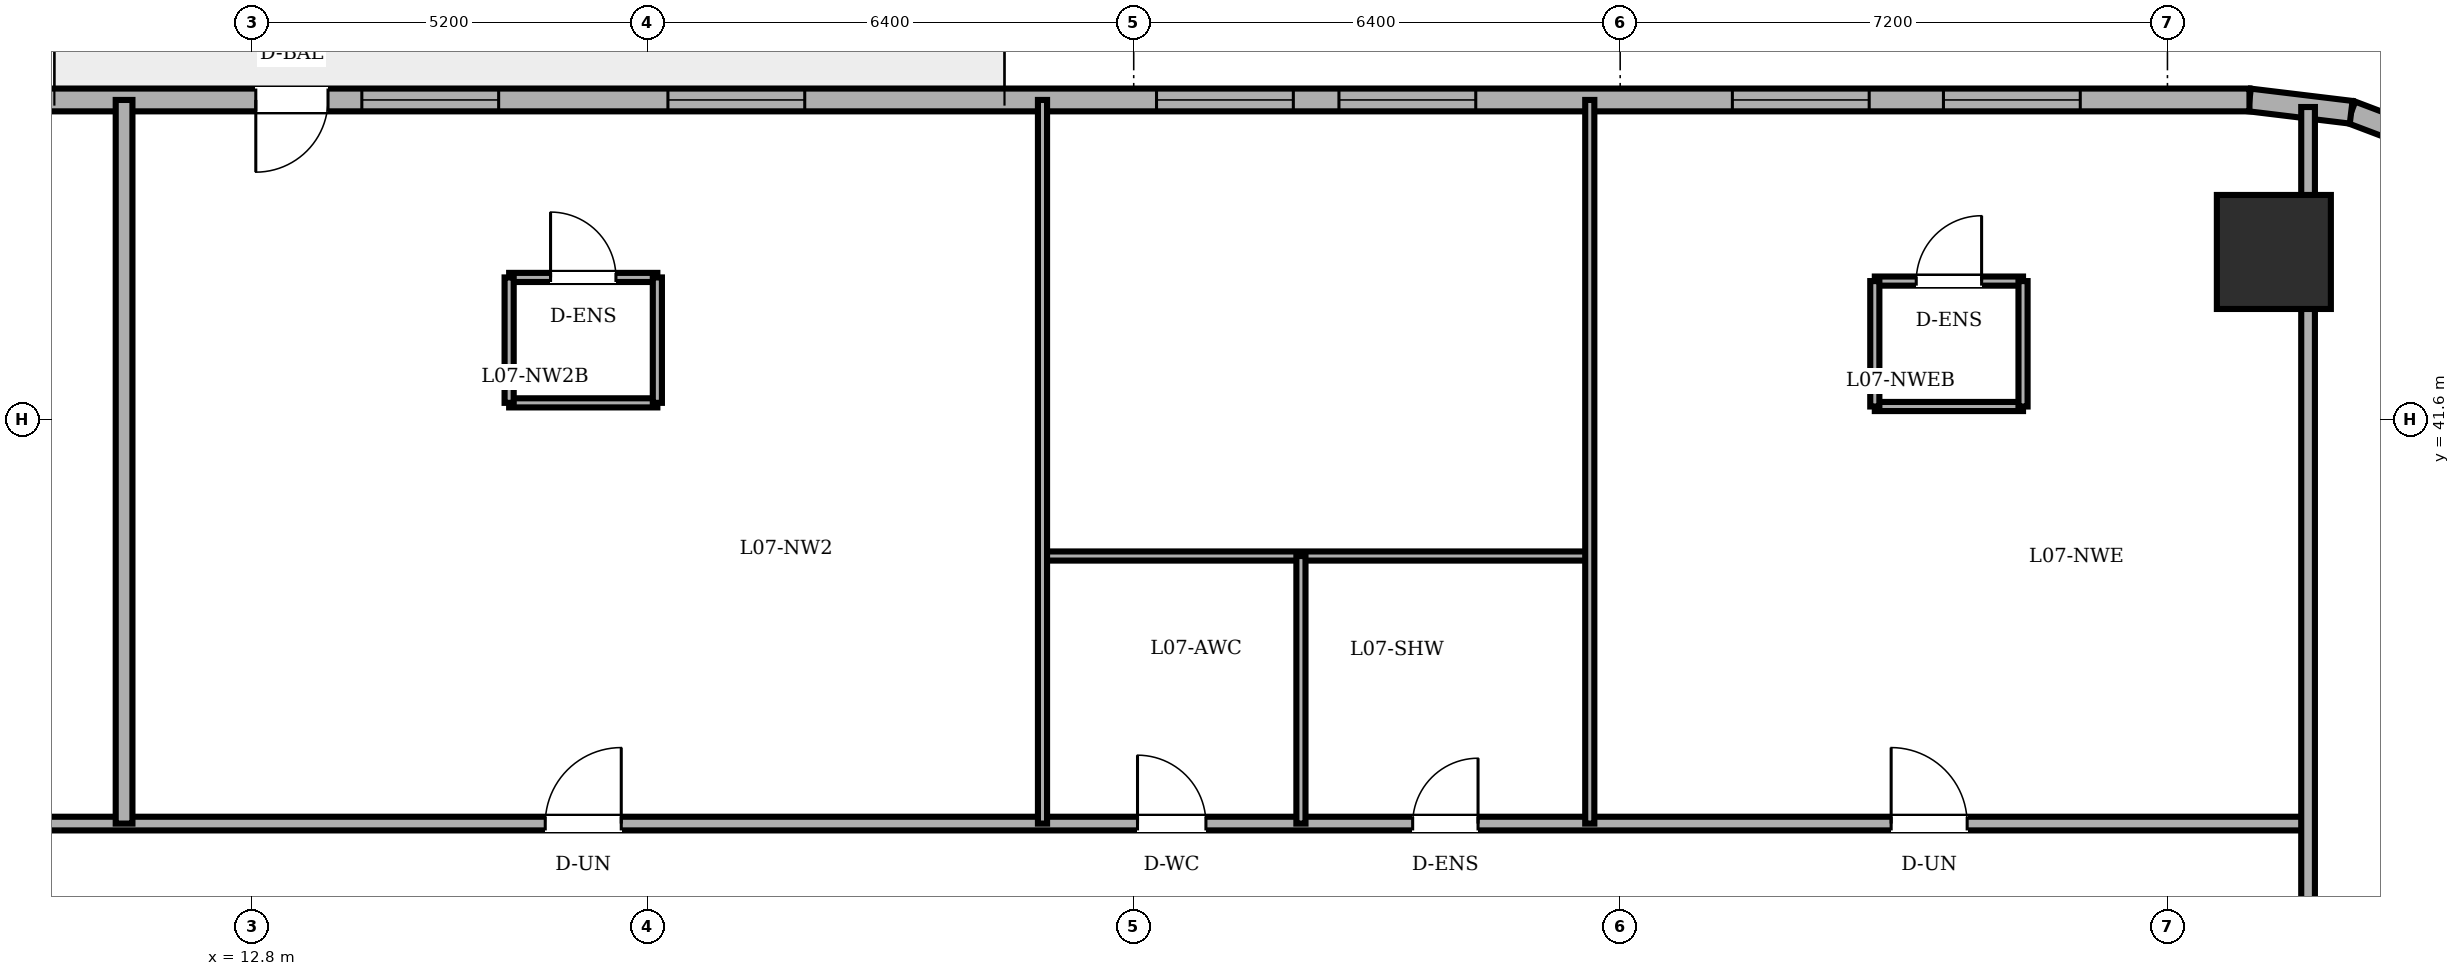
"""IFC4 building model, lengths in metres.
Left out: names, types, materials, properties, quantities, classifications, styles, units other than length and angle.
Written with IfcOpenShell. Run it as: python <this file> out.ifc"""

import sys

from ifc_helpers import new_model, si_unit, direction, frame, frame_2d, origin, origin_2d, place, context, subcontext, project, spatial, rectangle, circle, extrude, element, fill, save


model = new_model("IFC4")
c1 = context("Model", 3, precision=1e-05, world=origin(), true_north=direction((0.0, 1.0)))
c2 = subcontext(c1, "Body", "Model", "MODEL_VIEW")
j1 = project(units=[si_unit("LENGTHUNIT", "METRE"), si_unit("PLANEANGLEUNIT", "RADIAN")], contexts=[c1])
p1 = place(None, origin())
s1 = spatial("IfcSite", under=j1, at=p1, CompositionType="ELEMENT")
p2 = place(p1, origin())
s2 = spatial("IfcBuilding", under=s1, at=p2, CompositionType="ELEMENT")
p3 = place(p2, frame((0.0, 0.0, 28.8)))
s3 = spatial("IfcBuildingStorey", under=s2, at=p3, CompositionType="ELEMENT", Elevation=28.8)
p4 = place(p3, frame((39.4, 43.8, 0.0), z_axis=(0.0, 0.0, 1.0), x_axis=(1.0, 0.0, 0.0)))
e1 = element("IfcColumn", 1, at=p4, inside=s3, PredefinedType="COLUMN", context=c2, shape_type="SweptSolid", body=[
    extrude(circle(Radius=0.75, at=origin_2d()), origin(), (0.0, 0.0, 1.0), 3.6),
])
p5 = place(p3, frame((41.679, 45.16, 0.0), z_axis=(0.0, 0.0, 1.0), x_axis=(-0.935156721165, 0.354234254216, 0.0)))
e2 = element("IfcWall", 2, at=p5, inside=s3, PredefinedType="SOLIDWALL", context=c2, shape_type="SweptSolid", body=[
    extrude(rectangle(XDim=1.349, YDim=0.3, at=frame_2d((0.675, 0.0))), origin(), (0.0, 0.0, 1.0), 3.4),
])
p6 = place(p3, frame((40.417, 45.638, 0.0), z_axis=(0.0, 0.0, 1.0), x_axis=(-0.992739027259, 0.120288086515, 0.0)))
e3 = element("IfcWall", 3, at=p6, inside=s3, PredefinedType="SOLIDWALL", context=c2, shape_type="SweptSolid", body=[
    extrude(rectangle(XDim=1.348, YDim=0.3, at=frame_2d((0.674, 0.0))), origin(), (0.0, 0.0, 1.0), 3.4),
])
p7 = place(p3, frame((39.079, 45.8, 0.0), z_axis=(0.0, 0.0, 1.0), x_axis=(-1.0, 0.0, 0.0)))
e4 = element("IfcWall", 4, at=p7, inside=s3, PredefinedType="SOLIDWALL", context=c2, shape_type="SweptSolid", body=[
    extrude(rectangle(XDim=30.079, YDim=0.3, at=frame_2d((15.04, 0.0))), origin(), (0.0, 0.0, 1.0), 3.4),
])
p8 = place(p7, frame((25.279, 0.0, 0.0)))
e5 = element("IfcOpeningElement", 5, at=p8, cuts=e4, PredefinedType="OPENING", context=c2, shape_type="SweptSolid", body=[
    extrude(rectangle(XDim=0.95, YDim=2.2, at=frame_2d((0.475, 1.1))), frame((0.0, 0.16, 0.0), z_axis=(0.0, -1.0, 0.0), x_axis=(1.0, 0.0, 0.0)), (0.0, 0.0, 1.0), 0.32),
])
p9 = place(p7, frame((2.226, 0.0, 0.85)))
e6 = element("IfcOpeningElement", 6, at=p9, cuts=e4, PredefinedType="OPENING", context=c2, shape_type="SweptSolid", body=[
    extrude(rectangle(XDim=1.8, YDim=1.55, at=frame_2d((0.9, 0.775))), frame((0.0, 0.16, 0.0), z_axis=(0.0, -1.0, 0.0), x_axis=(1.0, 0.0, 0.0)), (0.0, 0.0, 1.0), 0.32),
])
p10 = place(p7, frame((5.003, 0.0, 0.85)))
e7 = element("IfcOpeningElement", 7, at=p10, cuts=e4, PredefinedType="OPENING", context=c2, shape_type="SweptSolid", body=[
    extrude(rectangle(XDim=1.8, YDim=1.55, at=frame_2d((0.9, 0.775))), frame((0.0, 0.16, 0.0), z_axis=(0.0, -1.0, 0.0), x_axis=(1.0, 0.0, 0.0)), (0.0, 0.0, 1.0), 0.32),
])
p11 = place(p7, frame((10.179, 0.0, 0.85)))
e8 = element("IfcOpeningElement", 8, at=p11, cuts=e4, PredefinedType="OPENING", context=c2, shape_type="SweptSolid", body=[
    extrude(rectangle(XDim=1.8, YDim=1.55, at=frame_2d((0.9, 0.775))), frame((0.0, 0.16, 0.0), z_axis=(0.0, -1.0, 0.0), x_axis=(1.0, 0.0, 0.0)), (0.0, 0.0, 1.0), 0.32),
])
p12 = place(p7, frame((12.579, 0.0, 0.85)))
e9 = element("IfcOpeningElement", 9, at=p12, cuts=e4, PredefinedType="OPENING", context=c2, shape_type="SweptSolid", body=[
    extrude(rectangle(XDim=1.8, YDim=1.55, at=frame_2d((0.9, 0.775))), frame((0.0, 0.16, 0.0), z_axis=(0.0, -1.0, 0.0), x_axis=(1.0, 0.0, 0.0)), (0.0, 0.0, 1.0), 0.32),
])
p13 = place(p7, frame((19.007, 0.0, 0.85)))
e10 = element("IfcOpeningElement", 10, at=p13, cuts=e4, PredefinedType="OPENING", context=c2, shape_type="SweptSolid", body=[
    extrude(rectangle(XDim=1.8, YDim=1.55, at=frame_2d((0.9, 0.775))), frame((0.0, 0.16, 0.0), z_axis=(0.0, -1.0, 0.0), x_axis=(1.0, 0.0, 0.0)), (0.0, 0.0, 1.0), 0.32),
])
p14 = place(p7, frame((23.034, 0.0, 0.85)))
e11 = element("IfcOpeningElement", 11, at=p14, cuts=e4, PredefinedType="OPENING", context=c2, shape_type="SweptSolid", body=[
    extrude(rectangle(XDim=1.8, YDim=1.55, at=frame_2d((0.9, 0.775))), frame((0.0, 0.16, 0.0), z_axis=(0.0, -1.0, 0.0), x_axis=(1.0, 0.0, 0.0)), (0.0, 0.0, 1.0), 0.32),
])
p15 = place(p3, frame((16.183, 43.465, 0.0), z_axis=(0.0, 0.0, 1.0), x_axis=(1.0, 0.0, 0.0)))
e12 = element("IfcWall", 12, at=p15, inside=s3, PredefinedType="PARTITIONING", context=c2, shape_type="SweptSolid", body=[
    extrude(rectangle(XDim=1.95, YDim=0.12, at=frame_2d((0.975, 0.0))), origin(), (0.0, 0.0, 1.0), 2.882),
])
p16 = place(p15, frame((0.545, 0.0, 0.0)))
e13 = element("IfcOpeningElement", 13, at=p16, cuts=e12, PredefinedType="OPENING", context=c2, shape_type="SweptSolid", body=[
    extrude(rectangle(XDim=0.86, YDim=2.1, at=frame_2d((0.43, 1.05))), frame((0.0, 0.07, 0.0), z_axis=(0.0, -1.0, 0.0), x_axis=(1.0, 0.0, 0.0)), (0.0, 0.0, 1.0), 0.14),
])
p17 = place(p3, frame((18.133, 41.815, 0.0), z_axis=(0.0, 0.0, 1.0), x_axis=(-1.0, 0.0, 0.0)))
e14 = element("IfcWall", 14, at=p17, inside=s3, PredefinedType="PARTITIONING", context=c2, shape_type="SweptSolid", body=[
    extrude(rectangle(XDim=1.95, YDim=0.12, at=frame_2d((0.975, 0.0))), origin(), (0.0, 0.0, 1.0), 3.4),
])
for number, where, z_axis, x_axis in (
    (15, (16.183, 43.465, 0.0), (0.0, 0.0, 1.0), (0.0, -1.0, 0.0)),
    (16, (18.133, 41.815, 0.0), (0.0, 0.0, 1.0), (0.0, 1.0, 0.0)),
):
    element("IfcWall", number, at=place(p3, frame(where, z_axis=z_axis, x_axis=x_axis)), inside=s3, PredefinedType="PARTITIONING", context=c2, shape_type="SweptSolid", body=[
        extrude(rectangle(XDim=1.65, YDim=0.12, at=frame_2d((0.825, 0.0))), origin(), (0.0, 0.0, 1.0), 3.4),
    ])
p18 = place(p3, frame((34.15, 43.417, 0.0), z_axis=(0.0, 0.0, 1.0), x_axis=(1.0, 0.0, 0.0)))
e17 = element("IfcWall", 17, at=p18, inside=s3, PredefinedType="PARTITIONING", context=c2, shape_type="SweptSolid", body=[
    extrude(rectangle(XDim=1.95, YDim=0.12, at=frame_2d((0.975, 0.0))), origin(), (0.0, 0.0, 1.0), 3.4),
])
p19 = place(p18, frame((0.545, 0.0, 0.0)))
e18 = element("IfcOpeningElement", 18, at=p19, cuts=e17, PredefinedType="OPENING", context=c2, shape_type="SweptSolid", body=[
    extrude(rectangle(XDim=0.86, YDim=2.1, at=frame_2d((0.43, 1.05))), frame((0.0, 0.07, 0.0), z_axis=(0.0, -1.0, 0.0), x_axis=(1.0, 0.0, 0.0)), (0.0, 0.0, 1.0), 0.14),
])
p20 = place(p3, frame((36.1, 41.767, 0.0), z_axis=(0.0, 0.0, 1.0), x_axis=(-1.0, 0.0, 0.0)))
e19 = element("IfcWall", 19, at=p20, inside=s3, PredefinedType="PARTITIONING", context=c2, shape_type="SweptSolid", body=[
    extrude(rectangle(XDim=1.95, YDim=0.12, at=frame_2d((0.975, 0.0))), origin(), (0.0, 0.0, 1.0), 3.4),
])
for number, where, z_axis, x_axis in (
    (20, (34.15, 43.417, 0.0), (0.0, 0.0, 1.0), (0.0, -1.0, 0.0)),
    (21, (36.1, 41.767, 0.0), (0.0, 0.0, 1.0), (0.0, 1.0, 0.0)),
):
    element("IfcWall", number, at=place(p3, frame(where, z_axis=z_axis, x_axis=x_axis)), inside=s3, PredefinedType="PARTITIONING", context=c2, shape_type="SweptSolid", body=[
        extrude(rectangle(XDim=1.65, YDim=0.12, at=frame_2d((0.825, 0.0))), origin(), (0.0, 0.0, 1.0), 3.4),
    ])
p21 = place(p3, frame((3.4, 36.28, 0.0), z_axis=(0.0, 0.0, 1.0), x_axis=(1.0, 0.0, 0.0)))
e22 = element("IfcWall", 22, at=p21, inside=s3, PredefinedType="PARTITIONING", context=c2, shape_type="SweptSolid", body=[
    extrude(rectangle(XDim=36.45, YDim=0.18, at=frame_2d((18.225, 0.0))), origin(), (0.0, 0.0, 1.0), 3.4),
])
p22 = place(p21, frame((21.05, 0.0, 0.0)))
e23 = element("IfcOpeningElement", 23, at=p22, cuts=e22, PredefinedType="OPENING", context=c2, shape_type="SweptSolid", body=[
    extrude(rectangle(XDim=0.9, YDim=2.1, at=frame_2d((0.45, 1.05))), frame((0.0, 0.1, 0.0), z_axis=(0.0, -1.0, 0.0), x_axis=(1.0, 0.0, 0.0)), (0.0, 0.0, 1.0), 0.2),
])
p23 = place(p21, frame((24.67, 0.0, 0.0)))
e24 = element("IfcOpeningElement", 24, at=p23, cuts=e22, PredefinedType="OPENING", context=c2, shape_type="SweptSolid", body=[
    extrude(rectangle(XDim=0.86, YDim=2.1, at=frame_2d((0.43, 1.05))), frame((0.0, 0.1, 0.0), z_axis=(0.0, -1.0, 0.0), x_axis=(1.0, 0.0, 0.0)), (0.0, 0.0, 1.0), 0.2),
])
p24 = place(p21, frame((4.659, 0.0, 0.0)))
e25 = element("IfcOpeningElement", 25, at=p24, cuts=e22, PredefinedType="OPENING", context=c2, shape_type="SweptSolid", body=[
    extrude(rectangle(XDim=1.0, YDim=2.15, at=frame_2d((0.5, 1.075))), frame((0.0, 0.1, 0.0), z_axis=(0.0, -1.0, 0.0), x_axis=(1.0, 0.0, 0.0)), (0.0, 0.0, 1.0), 0.2),
])
p25 = place(p21, frame((13.258, 0.0, 0.0)))
e26 = element("IfcOpeningElement", 26, at=p25, cuts=e22, PredefinedType="OPENING", context=c2, shape_type="SweptSolid", body=[
    extrude(rectangle(XDim=1.0, YDim=2.15, at=frame_2d((0.5, 1.075))), frame((0.0, 0.1, 0.0), z_axis=(0.0, -1.0, 0.0), x_axis=(1.0, 0.0, 0.0)), (0.0, 0.0, 1.0), 0.2),
])
p26 = place(p21, frame((30.965, 0.0, 0.0)))
e27 = element("IfcOpeningElement", 27, at=p26, cuts=e22, PredefinedType="OPENING", context=c2, shape_type="SweptSolid", body=[
    extrude(rectangle(XDim=1.0, YDim=2.15, at=frame_2d((0.5, 1.075))), frame((0.0, 0.1, 0.0), z_axis=(0.0, -1.0, 0.0), x_axis=(1.0, 0.0, 0.0)), (0.0, 0.0, 1.0), 0.2),
])
p27 = place(p3, frame((23.2, 39.8, 0.0), z_axis=(0.0, 0.0, 1.0), x_axis=(1.0, 0.0, 0.0)))
e28 = element("IfcWall", 28, at=p27, inside=s3, PredefinedType="PARTITIONING", context=c2, shape_type="SweptSolid", body=[
    extrude(rectangle(XDim=7.2, YDim=0.12, at=frame_2d((3.6, 0.0))), origin(), (0.0, 0.0, 1.0), 3.4),
])
p28 = place(p3, frame((11.117, 36.28, 0.0), z_axis=(0.0, 0.0, 1.0), x_axis=(0.0, 1.0, 0.0)))
e29 = element("IfcWall", 29, at=p28, inside=s3, PredefinedType="PARTITIONING", context=c2, shape_type="SweptSolid", body=[
    extrude(rectangle(XDim=9.52, YDim=0.22, at=frame_2d((4.76, 0.0))), origin(), (0.0, 0.0, 1.0), 3.4),
])
p29 = place(p3, frame((23.2, 36.28, 0.0), z_axis=(0.0, 0.0, 1.0), x_axis=(0.0, 1.0, 0.0)))
e30 = element("IfcWall", 30, at=p29, inside=s3, PredefinedType="PARTITIONING", context=c2, shape_type="SweptSolid", body=[
    extrude(rectangle(XDim=9.52, YDim=0.12, at=frame_2d((4.76, 0.0))), origin(), (0.0, 0.0, 1.0), 3.4),
])
p30 = place(p3, frame((26.6, 36.28, 0.0), z_axis=(0.0, 0.0, 1.0), x_axis=(0.0, 1.0, 0.0)))
e31 = element("IfcWall", 31, at=p30, inside=s3, PredefinedType="PARTITIONING", context=c2, shape_type="SweptSolid", body=[
    extrude(rectangle(XDim=3.52, YDim=0.12, at=frame_2d((1.76, 0.0))), origin(), (0.0, 0.0, 1.0), 3.4),
])
p31 = place(p3, frame((30.4, 36.28, 0.0), z_axis=(0.0, 0.0, 1.0), x_axis=(0.0, 1.0, 0.0)))
e32 = element("IfcWall", 32, at=p31, inside=s3, PredefinedType="PARTITIONING", context=c2, shape_type="SweptSolid", body=[
    extrude(rectangle(XDim=9.52, YDim=0.12, at=frame_2d((4.76, 0.0))), origin(), (0.0, 0.0, 1.0), 3.4),
])
p32 = place(p3, frame((39.85, 25.18, 0.0), z_axis=(0.0, 0.0, 1.0), x_axis=(0.0, 1.0, 0.0)))
e33 = element("IfcWall", 33, at=p32, inside=s3, PredefinedType="PARTITIONING", context=c2, shape_type="SweptSolid", body=[
    extrude(rectangle(XDim=20.527, YDim=0.18, at=frame_2d((10.264, 0.0))), origin(), (0.0, 0.0, 1.0), 2.782),
])
p33 = place(p32, frame((5.35, 0.0, 0.0)))
e34 = element("IfcOpeningElement", 34, at=p33, cuts=e33, PredefinedType="OPENING", context=c2, shape_type="SweptSolid", body=[
    extrude(rectangle(XDim=0.92, YDim=2.1, at=frame_2d((0.46, 1.05))), frame((0.0, 0.1, 0.0), z_axis=(0.0, -1.0, 0.0), x_axis=(1.0, 0.0, 0.0)), (0.0, 0.0, 1.0), 0.2),
])
p34 = place(p8, origin())
e35 = element("IfcDoor", 35, at=p34, inside=s3, OperationType="SINGLE_SWING_RIGHT", PredefinedType="DOOR", context=c2, shape_type="SweptSolid", body=[
    extrude(rectangle(XDim=0.95, YDim=2.2, at=frame_2d((0.475, 1.1))), frame((0.0, 0.025, 0.0), z_axis=(0.0, -1.0, 0.0), x_axis=(1.0, 0.0, 0.0)), (0.0, 0.0, 1.0), 0.05),
])
fill(e5, e35)
p35 = place(p9, origin())
e36 = element("IfcWindow", 36, at=p35, inside=s3, PartitioningType="DOUBLE_PANEL_VERTICAL", PredefinedType="WINDOW", context=c2, shape_type="SweptSolid", body=[
    extrude(rectangle(XDim=1.8, YDim=1.55, at=frame_2d((0.9, 0.775))), frame((0.0, 0.03, 0.0), z_axis=(0.0, -1.0, 0.0), x_axis=(1.0, 0.0, 0.0)), (0.0, 0.0, 1.0), 0.06),
])
fill(e6, e36)
p36 = place(p10, origin())
e37 = element("IfcWindow", 37, at=p36, inside=s3, PartitioningType="DOUBLE_PANEL_VERTICAL", PredefinedType="WINDOW", context=c2, shape_type="SweptSolid", body=[
    extrude(rectangle(XDim=1.8, YDim=1.55, at=frame_2d((0.9, 0.775))), frame((0.0, 0.03, 0.0), z_axis=(0.0, -1.0, 0.0), x_axis=(1.0, 0.0, 0.0)), (0.0, 0.0, 1.0), 0.06),
])
fill(e7, e37)
p37 = place(p11, origin())
e38 = element("IfcWindow", 38, at=p37, inside=s3, PartitioningType="DOUBLE_PANEL_VERTICAL", PredefinedType="WINDOW", context=c2, shape_type="SweptSolid", body=[
    extrude(rectangle(XDim=1.8, YDim=1.55, at=frame_2d((0.9, 0.775))), frame((0.0, 0.03, 0.0), z_axis=(0.0, -1.0, 0.0), x_axis=(1.0, 0.0, 0.0)), (0.0, 0.0, 1.0), 0.06),
])
fill(e8, e38)
p38 = place(p12, origin())
e39 = element("IfcWindow", 39, at=p38, inside=s3, PartitioningType="DOUBLE_PANEL_VERTICAL", PredefinedType="WINDOW", context=c2, shape_type="SweptSolid", body=[
    extrude(rectangle(XDim=1.8, YDim=1.55, at=frame_2d((0.9, 0.775))), frame((0.0, 0.03, 0.0), z_axis=(0.0, -1.0, 0.0), x_axis=(1.0, 0.0, 0.0)), (0.0, 0.0, 1.0), 0.06),
])
fill(e9, e39)
p39 = place(p13, origin())
e40 = element("IfcWindow", 40, at=p39, inside=s3, PartitioningType="DOUBLE_PANEL_VERTICAL", PredefinedType="WINDOW", context=c2, shape_type="SweptSolid", body=[
    extrude(rectangle(XDim=1.8, YDim=1.55, at=frame_2d((0.9, 0.775))), frame((0.0, 0.03, 0.0), z_axis=(0.0, -1.0, 0.0), x_axis=(1.0, 0.0, 0.0)), (0.0, 0.0, 1.0), 0.06),
])
fill(e10, e40)
p40 = place(p14, origin())
e41 = element("IfcWindow", 41, at=p40, inside=s3, PartitioningType="DOUBLE_PANEL_VERTICAL", PredefinedType="WINDOW", context=c2, shape_type="SweptSolid", body=[
    extrude(rectangle(XDim=1.8, YDim=1.55, at=frame_2d((0.9, 0.775))), frame((0.0, 0.03, 0.0), z_axis=(0.0, -1.0, 0.0), x_axis=(1.0, 0.0, 0.0)), (0.0, 0.0, 1.0), 0.06),
])
fill(e11, e41)
p41 = place(p16, origin())
e42 = element("IfcDoor", 42, at=p41, inside=s3, OperationType="SINGLE_SWING_LEFT", PredefinedType="DOOR", context=c2, shape_type="SweptSolid", body=[
    extrude(rectangle(XDim=0.86, YDim=2.1, at=frame_2d((0.43, 1.05))), frame((0.0, 0.025, 0.0), z_axis=(0.0, -1.0, 0.0), x_axis=(1.0, 0.0, 0.0)), (0.0, 0.0, 1.0), 0.05),
])
fill(e13, e42)
p42 = place(p19, origin())
e43 = element("IfcDoor", 43, at=p42, inside=s3, OperationType="SINGLE_SWING_RIGHT", PredefinedType="DOOR", context=c2, shape_type="SweptSolid", body=[
    extrude(rectangle(XDim=0.86, YDim=2.1, at=frame_2d((0.43, 1.05))), frame((0.0, 0.025, 0.0), z_axis=(0.0, -1.0, 0.0), x_axis=(1.0, 0.0, 0.0)), (0.0, 0.0, 1.0), 0.05),
])
fill(e18, e43)
p43 = place(p22, origin())
e44 = element("IfcDoor", 44, at=p43, inside=s3, OperationType="SINGLE_SWING_LEFT", PredefinedType="DOOR", context=c2, shape_type="SweptSolid", body=[
    extrude(rectangle(XDim=0.9, YDim=2.1, at=frame_2d((0.45, 1.05))), frame((0.0, 0.025, 0.0), z_axis=(0.0, -1.0, 0.0), x_axis=(1.0, 0.0, 0.0)), (0.0, 0.0, 1.0), 0.05),
])
fill(e23, e44)
p44 = place(p23, origin())
e45 = element("IfcDoor", 45, at=p44, inside=s3, OperationType="SINGLE_SWING_RIGHT", PredefinedType="DOOR", context=c2, shape_type="SweptSolid", body=[
    extrude(rectangle(XDim=0.86, YDim=2.1, at=frame_2d((0.43, 1.05))), frame((0.0, 0.025, 0.0), z_axis=(0.0, -1.0, 0.0), x_axis=(1.0, 0.0, 0.0)), (0.0, 0.0, 1.0), 0.05),
])
fill(e24, e45)
p45 = place(p25, origin())
e46 = element("IfcDoor", 46, at=p45, inside=s3, OperationType="SINGLE_SWING_RIGHT", PredefinedType="DOOR", context=c2, shape_type="SweptSolid", body=[
    extrude(rectangle(XDim=1.0, YDim=2.15, at=frame_2d((0.5, 1.075))), frame((0.0, 0.025, 0.0), z_axis=(0.0, -1.0, 0.0), x_axis=(1.0, 0.0, 0.0)), (0.0, 0.0, 1.0), 0.05),
])
fill(e26, e46)
p46 = place(p26, origin())
e47 = element("IfcDoor", 47, at=p46, inside=s3, OperationType="SINGLE_SWING_LEFT", PredefinedType="DOOR", context=c2, shape_type="SweptSolid", body=[
    extrude(rectangle(XDim=1.0, YDim=2.15, at=frame_2d((0.5, 1.075))), frame((0.0, 0.025, 0.0), z_axis=(0.0, -1.0, 0.0), x_axis=(1.0, 0.0, 0.0)), (0.0, 0.0, 1.0), 0.05),
])
fill(e27, e47)
save(model, sys.argv[1])
